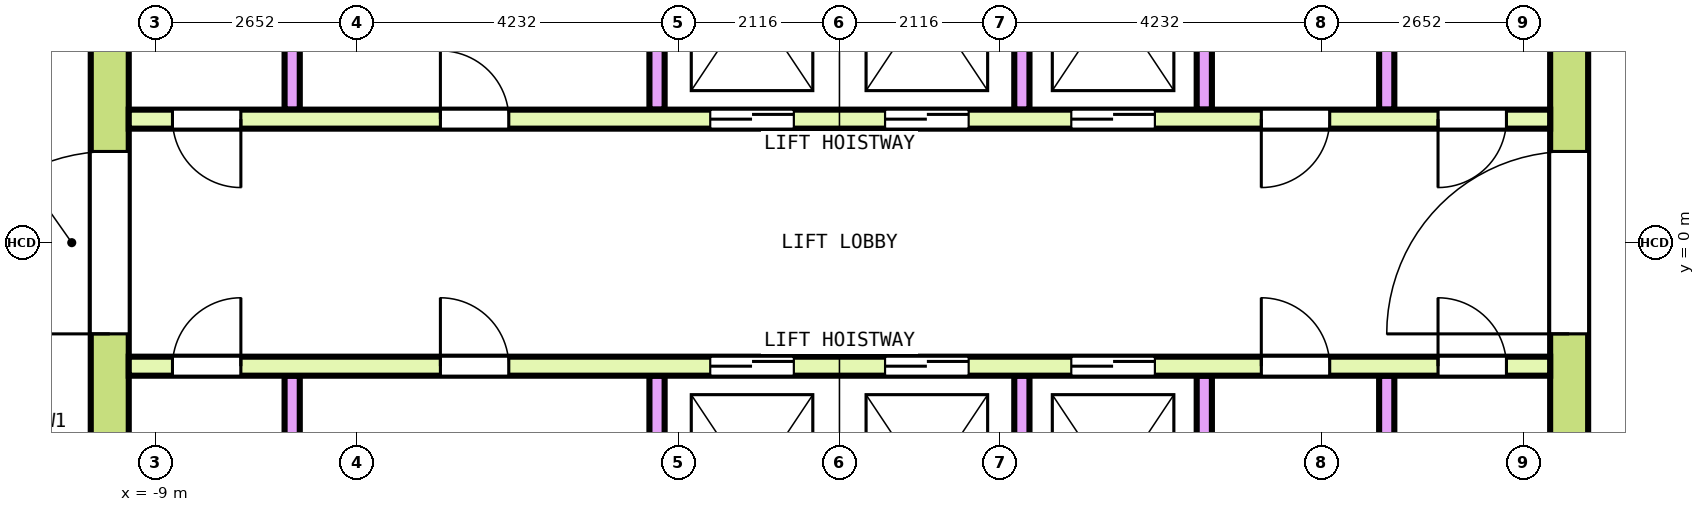
"""IFC4 building model, lengths in metres.
Left out: names, types, materials, properties, quantities, classifications, styles, units other than length and angle.
Written with IfcOpenShell. Run it as: python <this file> out.ifc"""

import sys

from ifc_helpers import new_model, si_unit, direction, frame, frame_2d, origin, place, context, subcontext, project, spatial, rectangle, extrude, element, fill, save


model = new_model("IFC4")
c1 = context("Model", 3, precision=1e-05, world=origin(), true_north=direction((0.0, 1.0)))
c2 = subcontext(c1, "Body", "Model", "MODEL_VIEW")
j1 = project(units=[si_unit("LENGTHUNIT", "METRE"), si_unit("PLANEANGLEUNIT", "RADIAN")], contexts=[c1])
p1 = place(None, origin())
s1 = spatial("IfcSite", under=j1, at=p1, CompositionType="ELEMENT")
p2 = place(p1, origin())
s2 = spatial("IfcBuilding", under=s1, at=p2, CompositionType="ELEMENT")
p3 = place(p2, frame((0.0, 0.0, 275.0)))
s3 = spatial("IfcBuildingStorey", under=s2, at=p3, CompositionType="ELEMENT", Elevation=275.0)
p4 = place(p3, frame((-9.6, -7.85, 0.0), z_axis=(0.0, 0.0, 1.0), x_axis=(0.0, 1.0, 0.0)))
e1 = element("IfcWall", 1, at=p4, inside=s3, PredefinedType="SHEAR", context=c2, shape_type="SweptSolid", body=[
    extrude(rectangle(XDim=15.7, YDim=0.5, at=frame_2d((7.85, 0.0))), origin(), (0.0, 0.0, 1.0), 3.7),
])
p5 = place(p4, frame((6.65, 0.0, 0.0)))
e2 = element("IfcOpeningElement", 2, at=p5, cuts=e1, PredefinedType="OPENING", context=c2, shape_type="SweptSolid", body=[
    extrude(rectangle(XDim=2.4, YDim=2.1, at=frame_2d((1.2, 1.05))), frame((0.0, 0.26, 0.0), z_axis=(0.0, -1.0, 0.0), x_axis=(1.0, 0.0, 0.0)), (0.0, 0.0, 1.0), 0.52),
])
p6 = place(p4, frame((13.55, 0.0, 0.0)))
e3 = element("IfcOpeningElement", 3, at=p6, cuts=e1, PredefinedType="OPENING", context=c2, shape_type="SweptSolid", body=[
    extrude(rectangle(XDim=1.2, YDim=2.1, at=frame_2d((0.6, 1.05))), frame((0.0, 0.26, 0.0), z_axis=(0.0, -1.0, 0.0), x_axis=(1.0, 0.0, 0.0)), (0.0, 0.0, 1.0), 0.52),
])
p7 = place(p4, frame((0.95, 0.0, 0.0)))
e4 = element("IfcOpeningElement", 4, at=p7, cuts=e1, PredefinedType="OPENING", context=c2, shape_type="SweptSolid", body=[
    extrude(rectangle(XDim=1.2, YDim=2.1, at=frame_2d((0.6, 1.05))), frame((0.0, 0.26, 0.0), z_axis=(0.0, -1.0, 0.0), x_axis=(1.0, 0.0, 0.0)), (0.0, 0.0, 1.0), 0.52),
])
p8 = place(p3, frame((9.6, -7.85, 0.0), z_axis=(0.0, 0.0, 1.0), x_axis=(0.0, 1.0, 0.0)))
e5 = element("IfcWall", 5, at=p8, inside=s3, PredefinedType="SHEAR", context=c2, shape_type="SweptSolid", body=[
    extrude(rectangle(XDim=15.7, YDim=0.5, at=frame_2d((7.85, 0.0))), origin(), (0.0, 0.0, 1.0), 3.7),
])
p9 = place(p8, frame((6.65, 0.0, 0.0)))
e6 = element("IfcOpeningElement", 6, at=p9, cuts=e5, PredefinedType="OPENING", context=c2, shape_type="SweptSolid", body=[
    extrude(rectangle(XDim=2.4, YDim=2.1, at=frame_2d((1.2, 1.05))), frame((0.0, 0.26, 0.0), z_axis=(0.0, -1.0, 0.0), x_axis=(1.0, 0.0, 0.0)), (0.0, 0.0, 1.0), 0.52),
])
p10 = place(p8, frame((13.55, 0.0, 0.0)))
e7 = element("IfcOpeningElement", 7, at=p10, cuts=e5, PredefinedType="OPENING", context=c2, shape_type="SweptSolid", body=[
    extrude(rectangle(XDim=1.2, YDim=2.1, at=frame_2d((0.6, 1.05))), frame((0.0, 0.26, 0.0), z_axis=(0.0, -1.0, 0.0), x_axis=(1.0, 0.0, 0.0)), (0.0, 0.0, 1.0), 0.52),
])
p11 = place(p8, frame((1.05, 0.0, 0.0)))
e8 = element("IfcOpeningElement", 8, at=p11, cuts=e5, PredefinedType="OPENING", context=c2, shape_type="SweptSolid", body=[
    extrude(rectangle(XDim=1.0, YDim=2.1, at=frame_2d((0.5, 1.05))), frame((0.0, 0.26, 0.0), z_axis=(0.0, -1.0, 0.0), x_axis=(1.0, 0.0, 0.0)), (0.0, 0.0, 1.0), 0.52),
])
p12 = place(p3, frame((-9.35, 1.625, 0.0), z_axis=(0.0, 0.0, 1.0), x_axis=(1.0, 0.0, 0.0)))
e9 = element("IfcWall", 9, at=p12, inside=s3, PredefinedType="SOLIDWALL", context=c2, shape_type="SweptSolid", body=[
    extrude(rectangle(XDim=18.7, YDim=0.25, at=frame_2d((9.35, 0.0))), origin(), (0.0, 0.0, 1.0), 3.7),
])
p13 = place(p12, frame((7.65, 0.0, 0.0)))
e10 = element("IfcOpeningElement", 10, at=p13, cuts=e9, PredefinedType="OPENING", context=c2, shape_type="SweptSolid", body=[
    extrude(rectangle(XDim=1.1, YDim=2.1, at=frame_2d((0.55, 1.05))), frame((0.0, 0.135, 0.0), z_axis=(0.0, -1.0, 0.0), x_axis=(1.0, 0.0, 0.0)), (0.0, 0.0, 1.0), 0.27),
])
p14 = place(p12, frame((9.95, 0.0, 0.0)))
e11 = element("IfcOpeningElement", 11, at=p14, cuts=e9, PredefinedType="OPENING", context=c2, shape_type="SweptSolid", body=[
    extrude(rectangle(XDim=1.1, YDim=2.1, at=frame_2d((0.55, 1.05))), frame((0.0, 0.135, 0.0), z_axis=(0.0, -1.0, 0.0), x_axis=(1.0, 0.0, 0.0)), (0.0, 0.0, 1.0), 0.27),
])
p15 = place(p12, frame((12.4, 0.0, 0.0)))
e12 = element("IfcOpeningElement", 12, at=p15, cuts=e9, PredefinedType="OPENING", context=c2, shape_type="SweptSolid", body=[
    extrude(rectangle(XDim=1.1, YDim=2.1, at=frame_2d((0.55, 1.05))), frame((0.0, 0.135, 0.0), z_axis=(0.0, -1.0, 0.0), x_axis=(1.0, 0.0, 0.0)), (0.0, 0.0, 1.0), 0.27),
])
p16 = place(p12, frame((0.575, 0.0, 0.0)))
e13 = element("IfcOpeningElement", 13, at=p16, cuts=e9, PredefinedType="OPENING", context=c2, shape_type="SweptSolid", body=[
    extrude(rectangle(XDim=0.9, YDim=2.1, at=frame_2d((0.45, 1.05))), frame((0.0, 0.135, 0.0), z_axis=(0.0, -1.0, 0.0), x_axis=(1.0, 0.0, 0.0)), (0.0, 0.0, 1.0), 0.27),
])
p17 = place(p12, frame((4.1, 0.0, 0.0)))
e14 = element("IfcOpeningElement", 14, at=p17, cuts=e9, PredefinedType="OPENING", context=c2, shape_type="SweptSolid", body=[
    extrude(rectangle(XDim=0.9, YDim=2.1, at=frame_2d((0.45, 1.05))), frame((0.0, 0.135, 0.0), z_axis=(0.0, -1.0, 0.0), x_axis=(1.0, 0.0, 0.0)), (0.0, 0.0, 1.0), 0.27),
])
p18 = place(p12, frame((14.9, 0.0, 0.0)))
e15 = element("IfcOpeningElement", 15, at=p18, cuts=e9, PredefinedType="OPENING", context=c2, shape_type="SweptSolid", body=[
    extrude(rectangle(XDim=0.9, YDim=2.1, at=frame_2d((0.45, 1.05))), frame((0.0, 0.135, 0.0), z_axis=(0.0, -1.0, 0.0), x_axis=(1.0, 0.0, 0.0)), (0.0, 0.0, 1.0), 0.27),
])
p19 = place(p12, frame((17.225, 0.0, 0.0)))
e16 = element("IfcOpeningElement", 16, at=p19, cuts=e9, PredefinedType="OPENING", context=c2, shape_type="SweptSolid", body=[
    extrude(rectangle(XDim=0.9, YDim=2.1, at=frame_2d((0.45, 1.05))), frame((0.0, 0.135, 0.0), z_axis=(0.0, -1.0, 0.0), x_axis=(1.0, 0.0, 0.0)), (0.0, 0.0, 1.0), 0.27),
])
for number, where, z_axis, x_axis in (
    (17, (-7.2, 1.75, 0.0), (0.0, 0.0, 1.0), (0.0, 1.0, 0.0)),
    (18, (-2.4, 1.75, 0.0), (0.0, 0.0, 1.0), (0.0, 1.0, 0.0)),
    (19, (2.4, 1.75, 0.0), (0.0, 0.0, 1.0), (0.0, 1.0, 0.0)),
    (20, (4.8, 1.75, 0.0), (0.0, 0.0, 1.0), (0.0, 1.0, 0.0)),
    (21, (7.2, 1.75, 0.0), (0.0, 0.0, 1.0), (0.0, 1.0, 0.0)),
):
    element("IfcWall", number, at=place(p3, frame(where, z_axis=z_axis, x_axis=x_axis)), inside=s3, PredefinedType="SOLIDWALL", context=c2, shape_type="SweptSolid", body=[
        extrude(rectangle(XDim=2.9, YDim=0.2, at=frame_2d((1.45, 0.0))), origin(), (0.0, 0.0, 1.0), 3.7),
    ])
p20 = place(p3, frame((-9.35, -1.625, 0.0), z_axis=(0.0, 0.0, 1.0), x_axis=(1.0, 0.0, 0.0)))
e22 = element("IfcWall", 22, at=p20, inside=s3, PredefinedType="SOLIDWALL", context=c2, shape_type="SweptSolid", body=[
    extrude(rectangle(XDim=18.7, YDim=0.25, at=frame_2d((9.35, 0.0))), origin(), (0.0, 0.0, 1.0), 3.7),
])
p21 = place(p20, frame((7.65, 0.0, 0.0)))
e23 = element("IfcOpeningElement", 23, at=p21, cuts=e22, PredefinedType="OPENING", context=c2, shape_type="SweptSolid", body=[
    extrude(rectangle(XDim=1.1, YDim=2.1, at=frame_2d((0.55, 1.05))), frame((0.0, 0.135, 0.0), z_axis=(0.0, -1.0, 0.0), x_axis=(1.0, 0.0, 0.0)), (0.0, 0.0, 1.0), 0.27),
])
p22 = place(p20, frame((9.95, 0.0, 0.0)))
e24 = element("IfcOpeningElement", 24, at=p22, cuts=e22, PredefinedType="OPENING", context=c2, shape_type="SweptSolid", body=[
    extrude(rectangle(XDim=1.1, YDim=2.1, at=frame_2d((0.55, 1.05))), frame((0.0, 0.135, 0.0), z_axis=(0.0, -1.0, 0.0), x_axis=(1.0, 0.0, 0.0)), (0.0, 0.0, 1.0), 0.27),
])
p23 = place(p20, frame((12.4, 0.0, 0.0)))
e25 = element("IfcOpeningElement", 25, at=p23, cuts=e22, PredefinedType="OPENING", context=c2, shape_type="SweptSolid", body=[
    extrude(rectangle(XDim=1.1, YDim=2.1, at=frame_2d((0.55, 1.05))), frame((0.0, 0.135, 0.0), z_axis=(0.0, -1.0, 0.0), x_axis=(1.0, 0.0, 0.0)), (0.0, 0.0, 1.0), 0.27),
])
p24 = place(p20, frame((0.575, 0.0, 0.0)))
e26 = element("IfcOpeningElement", 26, at=p24, cuts=e22, PredefinedType="OPENING", context=c2, shape_type="SweptSolid", body=[
    extrude(rectangle(XDim=0.9, YDim=2.1, at=frame_2d((0.45, 1.05))), frame((0.0, 0.135, 0.0), z_axis=(0.0, -1.0, 0.0), x_axis=(1.0, 0.0, 0.0)), (0.0, 0.0, 1.0), 0.27),
])
p25 = place(p20, frame((4.1, 0.0, 0.0)))
e27 = element("IfcOpeningElement", 27, at=p25, cuts=e22, PredefinedType="OPENING", context=c2, shape_type="SweptSolid", body=[
    extrude(rectangle(XDim=0.9, YDim=2.1, at=frame_2d((0.45, 1.05))), frame((0.0, 0.135, 0.0), z_axis=(0.0, -1.0, 0.0), x_axis=(1.0, 0.0, 0.0)), (0.0, 0.0, 1.0), 0.27),
])
p26 = place(p20, frame((14.9, 0.0, 0.0)))
e28 = element("IfcOpeningElement", 28, at=p26, cuts=e22, PredefinedType="OPENING", context=c2, shape_type="SweptSolid", body=[
    extrude(rectangle(XDim=0.9, YDim=2.1, at=frame_2d((0.45, 1.05))), frame((0.0, 0.135, 0.0), z_axis=(0.0, -1.0, 0.0), x_axis=(1.0, 0.0, 0.0)), (0.0, 0.0, 1.0), 0.27),
])
p27 = place(p20, frame((17.225, 0.0, 0.0)))
e29 = element("IfcOpeningElement", 29, at=p27, cuts=e22, PredefinedType="OPENING", context=c2, shape_type="SweptSolid", body=[
    extrude(rectangle(XDim=0.9, YDim=2.1, at=frame_2d((0.45, 1.05))), frame((0.0, 0.135, 0.0), z_axis=(0.0, -1.0, 0.0), x_axis=(1.0, 0.0, 0.0)), (0.0, 0.0, 1.0), 0.27),
])
for number, where, z_axis, x_axis in (
    (30, (-7.2, -4.65, 0.0), (0.0, 0.0, 1.0), (0.0, 1.0, 0.0)),
    (31, (-2.4, -4.65, 0.0), (0.0, 0.0, 1.0), (0.0, 1.0, 0.0)),
    (32, (2.4, -4.65, 0.0), (0.0, 0.0, 1.0), (0.0, 1.0, 0.0)),
    (33, (4.8, -4.65, 0.0), (0.0, 0.0, 1.0), (0.0, 1.0, 0.0)),
    (34, (7.2, -4.65, 0.0), (0.0, 0.0, 1.0), (0.0, 1.0, 0.0)),
):
    element("IfcWall", number, at=place(p3, frame(where, z_axis=z_axis, x_axis=x_axis)), inside=s3, PredefinedType="SOLIDWALL", context=c2, shape_type="SweptSolid", body=[
        extrude(rectangle(XDim=2.9, YDim=0.2, at=frame_2d((1.45, 0.0))), origin(), (0.0, 0.0, 1.0), 3.7),
    ])
p28 = place(p13, origin())
e35 = element("IfcDoor", 35, at=p28, inside=s3, OperationType="DOUBLE_DOOR_SLIDING", PredefinedType="DOOR", context=c2, shape_type="SweptSolid", body=[
    extrude(rectangle(XDim=1.1, YDim=2.1, at=frame_2d((0.55, 1.05))), frame((0.0, 0.075, 0.0), z_axis=(0.0, -1.0, 0.0), x_axis=(1.0, 0.0, 0.0)), (0.0, 0.0, 1.0), 0.15),
])
fill(e10, e35)
p29 = place(p14, origin())
e36 = element("IfcDoor", 36, at=p29, inside=s3, OperationType="DOUBLE_DOOR_SLIDING", PredefinedType="DOOR", context=c2, shape_type="SweptSolid", body=[
    extrude(rectangle(XDim=1.1, YDim=2.1, at=frame_2d((0.55, 1.05))), frame((0.0, 0.075, 0.0), z_axis=(0.0, -1.0, 0.0), x_axis=(1.0, 0.0, 0.0)), (0.0, 0.0, 1.0), 0.15),
])
fill(e11, e36)
p30 = place(p15, origin())
e37 = element("IfcDoor", 37, at=p30, inside=s3, OperationType="DOUBLE_DOOR_SLIDING", PredefinedType="DOOR", context=c2, shape_type="SweptSolid", body=[
    extrude(rectangle(XDim=1.1, YDim=2.1, at=frame_2d((0.55, 1.05))), frame((0.0, 0.075, 0.0), z_axis=(0.0, -1.0, 0.0), x_axis=(1.0, 0.0, 0.0)), (0.0, 0.0, 1.0), 0.15),
])
fill(e12, e37)
p31 = place(p21, origin())
e38 = element("IfcDoor", 38, at=p31, inside=s3, OperationType="DOUBLE_DOOR_SLIDING", PredefinedType="DOOR", context=c2, shape_type="SweptSolid", body=[
    extrude(rectangle(XDim=1.1, YDim=2.1, at=frame_2d((0.55, 1.05))), frame((0.0, 0.075, 0.0), z_axis=(0.0, -1.0, 0.0), x_axis=(1.0, 0.0, 0.0)), (0.0, 0.0, 1.0), 0.15),
])
fill(e23, e38)
p32 = place(p22, origin())
e39 = element("IfcDoor", 39, at=p32, inside=s3, OperationType="DOUBLE_DOOR_SLIDING", PredefinedType="DOOR", context=c2, shape_type="SweptSolid", body=[
    extrude(rectangle(XDim=1.1, YDim=2.1, at=frame_2d((0.55, 1.05))), frame((0.0, 0.075, 0.0), z_axis=(0.0, -1.0, 0.0), x_axis=(1.0, 0.0, 0.0)), (0.0, 0.0, 1.0), 0.15),
])
fill(e24, e39)
p33 = place(p23, origin())
e40 = element("IfcDoor", 40, at=p33, inside=s3, OperationType="DOUBLE_DOOR_SLIDING", PredefinedType="DOOR", context=c2, shape_type="SweptSolid", body=[
    extrude(rectangle(XDim=1.1, YDim=2.1, at=frame_2d((0.55, 1.05))), frame((0.0, 0.075, 0.0), z_axis=(0.0, -1.0, 0.0), x_axis=(1.0, 0.0, 0.0)), (0.0, 0.0, 1.0), 0.15),
])
fill(e25, e40)
p34 = place(p5, origin())
e41 = element("IfcDoor", 41, at=p34, inside=s3, OperationType="DOUBLE_DOOR_SINGLE_SWING", PredefinedType="DOOR", context=c2, shape_type="SweptSolid", body=[
    extrude(rectangle(XDim=2.4, YDim=2.1, at=frame_2d((1.2, 1.05))), frame((0.0, 0.2, 0.0), z_axis=(0.0, -1.0, 0.0), x_axis=(1.0, 0.0, 0.0)), (0.0, 0.0, 1.0), 0.4),
])
fill(e2, e41)
p35 = place(p9, origin())
e42 = element("IfcDoor", 42, at=p35, inside=s3, OperationType="DOUBLE_DOOR_SINGLE_SWING", PredefinedType="DOOR", context=c2, shape_type="SweptSolid", body=[
    extrude(rectangle(XDim=2.4, YDim=2.1, at=frame_2d((1.2, 1.05))), frame((0.0, 0.2, 0.0), z_axis=(0.0, -1.0, 0.0), x_axis=(1.0, 0.0, 0.0)), (0.0, 0.0, 1.0), 0.4),
])
fill(e6, e42)
p36 = place(p16, origin())
e43 = element("IfcDoor", 43, at=p36, inside=s3, OperationType="SINGLE_SWING_RIGHT", PredefinedType="DOOR", context=c2, shape_type="SweptSolid", body=[
    extrude(rectangle(XDim=0.9, YDim=2.1, at=frame_2d((0.45, 1.05))), frame((0.0, 0.075, 0.0), z_axis=(0.0, -1.0, 0.0), x_axis=(1.0, 0.0, 0.0)), (0.0, 0.0, 1.0), 0.15),
])
fill(e13, e43)
p37 = place(p17, origin())
e44 = element("IfcDoor", 44, at=p37, inside=s3, OperationType="SINGLE_SWING_LEFT", PredefinedType="DOOR", context=c2, shape_type="SweptSolid", body=[
    extrude(rectangle(XDim=0.9, YDim=2.1, at=frame_2d((0.45, 1.05))), frame((0.0, 0.075, 0.0), z_axis=(0.0, -1.0, 0.0), x_axis=(1.0, 0.0, 0.0)), (0.0, 0.0, 1.0), 0.15),
])
fill(e14, e44)
p38 = place(p18, origin())
e45 = element("IfcDoor", 45, at=p38, inside=s3, OperationType="SINGLE_SWING_RIGHT", PredefinedType="DOOR", context=c2, shape_type="SweptSolid", body=[
    extrude(rectangle(XDim=0.9, YDim=2.1, at=frame_2d((0.45, 1.05))), frame((0.0, 0.075, 0.0), z_axis=(0.0, -1.0, 0.0), x_axis=(1.0, 0.0, 0.0)), (0.0, 0.0, 1.0), 0.15),
])
fill(e15, e45)
p39 = place(p19, origin())
e46 = element("IfcDoor", 46, at=p39, inside=s3, OperationType="SINGLE_SWING_LEFT", PredefinedType="DOOR", context=c2, shape_type="SweptSolid", body=[
    extrude(rectangle(XDim=0.9, YDim=2.1, at=frame_2d((0.45, 1.05))), frame((0.0, 0.075, 0.0), z_axis=(0.0, -1.0, 0.0), x_axis=(1.0, 0.0, 0.0)), (0.0, 0.0, 1.0), 0.15),
])
fill(e16, e46)
p40 = place(p24, origin())
e47 = element("IfcDoor", 47, at=p40, inside=s3, OperationType="SINGLE_SWING_RIGHT", PredefinedType="DOOR", context=c2, shape_type="SweptSolid", body=[
    extrude(rectangle(XDim=0.9, YDim=2.1, at=frame_2d((0.45, 1.05))), frame((0.0, 0.075, 0.0), z_axis=(0.0, -1.0, 0.0), x_axis=(1.0, 0.0, 0.0)), (0.0, 0.0, 1.0), 0.15),
])
fill(e26, e47)
p41 = place(p25, origin())
e48 = element("IfcDoor", 48, at=p41, inside=s3, OperationType="SINGLE_SWING_LEFT", PredefinedType="DOOR", context=c2, shape_type="SweptSolid", body=[
    extrude(rectangle(XDim=0.9, YDim=2.1, at=frame_2d((0.45, 1.05))), frame((0.0, 0.075, 0.0), z_axis=(0.0, -1.0, 0.0), x_axis=(1.0, 0.0, 0.0)), (0.0, 0.0, 1.0), 0.15),
])
fill(e27, e48)
p42 = place(p26, origin())
e49 = element("IfcDoor", 49, at=p42, inside=s3, OperationType="SINGLE_SWING_RIGHT", PredefinedType="DOOR", context=c2, shape_type="SweptSolid", body=[
    extrude(rectangle(XDim=0.9, YDim=2.1, at=frame_2d((0.45, 1.05))), frame((0.0, 0.075, 0.0), z_axis=(0.0, -1.0, 0.0), x_axis=(1.0, 0.0, 0.0)), (0.0, 0.0, 1.0), 0.15),
])
fill(e28, e49)
p43 = place(p27, origin())
e50 = element("IfcDoor", 50, at=p43, inside=s3, OperationType="SINGLE_SWING_LEFT", PredefinedType="DOOR", context=c2, shape_type="SweptSolid", body=[
    extrude(rectangle(XDim=0.9, YDim=2.1, at=frame_2d((0.45, 1.05))), frame((0.0, 0.075, 0.0), z_axis=(0.0, -1.0, 0.0), x_axis=(1.0, 0.0, 0.0)), (0.0, 0.0, 1.0), 0.15),
])
fill(e29, e50)
save(model, sys.argv[1])
